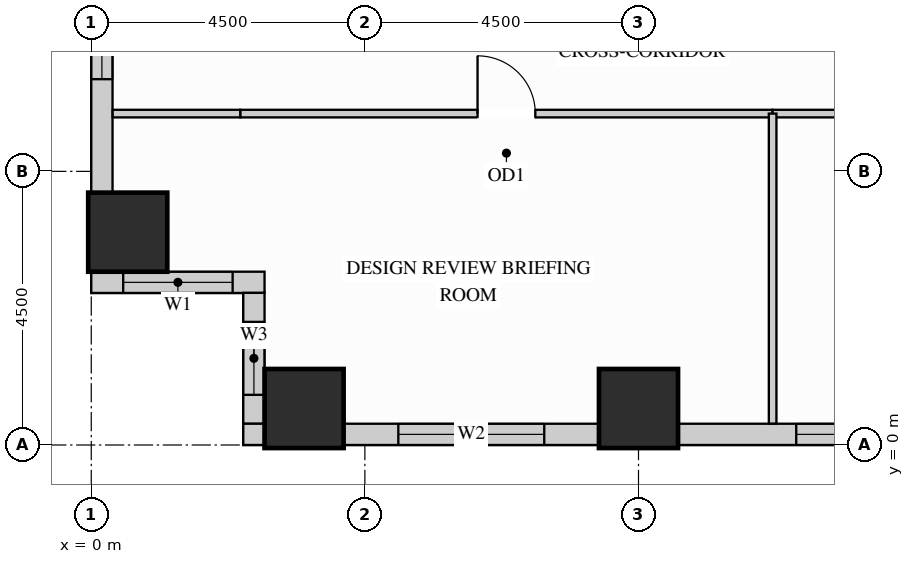
"""IFC4 building model, lengths in metres.
Left out: names, types, materials, properties, quantities, classifications, styles, units other than length and angle.
Written with IfcOpenShell. Run it as: python <this file> out.ifc"""

import sys

from ifc_helpers import new_model, si_unit, direction, frame, frame_2d, origin, origin_2d, place, context, subcontext, project, spatial, rectangle, extrude, source, transform, mapped, element, fill, save


model = new_model("IFC4")
c1 = context("Model", 3, precision=1e-05, world=origin(), true_north=direction((0.0, 1.0)))
c2 = subcontext(c1, "Body", "Model", "MODEL_VIEW")
j1 = project(units=[si_unit("LENGTHUNIT", "METRE"), si_unit("PLANEANGLEUNIT", "RADIAN")], contexts=[c1])
p1 = place(None, origin())
s1 = spatial("IfcSite", under=j1, at=p1, CompositionType="ELEMENT")
p2 = place(p1, origin())
s2 = spatial("IfcBuilding", under=s1, at=p2, CompositionType="ELEMENT")
p3 = place(p2, frame((0.0, 0.0, 26.1)))
s3 = spatial("IfcBuildingStorey", under=s2, at=p3, CompositionType="ELEMENT", Elevation=26.1)
m1 = source(origin(), c2, "Body", "SweptSolid", [
    extrude(rectangle(XDim=1.3, YDim=1.3, at=origin_2d()), origin(), (0.0, 0.0, 1.0), 3.38),
])
for number, where, z_axis, x_axis in (
    (1, (3.5, 0.6, 0.0), (0.0, 0.0, 1.0), (1.0, 0.0, 0.0)),
    (2, (9.0, 0.6, 0.0), (0.0, 0.0, 1.0), (1.0, 0.0, 0.0)),
    (3, (0.6, 3.5, 0.0), (0.0, 0.0, 1.0), (1.0, 0.0, 0.0)),
):
    element("IfcColumn", number, at=place(p3, frame(where, z_axis=z_axis, x_axis=x_axis)), inside=s3, PredefinedType="COLUMN", context=c2, shape_type="MappedRepresentation", body=[
        mapped(m1, transform((0.0, 0.0, 0.0), x_axis=(1.0, 0.0, 0.0), y_axis=(0.0, 1.0, 0.0), z_axis=(0.0, 0.0, 1.0))),
    ])
p4 = place(p3, frame((0.175, 7.852, 0.0), z_axis=(0.0, 0.0, 1.0), x_axis=(0.0, -1.0, 0.0)))
e4 = element("IfcWall", 4, at=p4, inside=s3, PredefinedType="SOLIDWALL", context=c2, shape_type="SweptSolid", body=[
    extrude(rectangle(XDim=3.704, YDim=0.35, at=frame_2d((1.852, 0.0))), origin(), (0.0, 0.0, 1.0), 2.51),
])
p5 = place(p4, frame((0.636, 0.0, 0.78)))
e5 = element("IfcOpeningElement", 5, at=p5, cuts=e4, PredefinedType="OPENING", context=c2, shape_type="SweptSolid", body=[
    extrude(rectangle(XDim=1.2, YDim=1.55, at=frame_2d((0.6, 0.775))), frame((0.0, 0.185, 0.0), z_axis=(0.0, -1.0, 0.0), x_axis=(1.0, 0.0, 0.0)), (0.0, 0.0, 1.0), 0.37),
])
p6 = place(p3, frame((0.0, 2.675, 0.0), z_axis=(0.0, 0.0, 1.0), x_axis=(1.0, 0.0, 0.0)))
e6 = element("IfcWall", 6, at=p6, inside=s3, PredefinedType="SOLIDWALL", context=c2, shape_type="SweptSolid", body=[
    extrude(rectangle(XDim=2.85, YDim=0.35, at=frame_2d((1.425, 0.0))), origin(), (0.0, 0.0, 1.0), 3.365),
])
p7 = place(p6, frame((0.525, 0.0, 0.78)))
e7 = element("IfcOpeningElement", 7, at=p7, cuts=e6, PredefinedType="OPENING", context=c2, shape_type="SweptSolid", body=[
    extrude(rectangle(XDim=1.8, YDim=2.1, at=frame_2d((0.9, 1.05))), frame((0.0, 0.185, 0.0), z_axis=(0.0, -1.0, 0.0), x_axis=(1.0, 0.0, 0.0)), (0.0, 0.0, 1.0), 0.37),
])
p8 = place(p3, frame((2.675, 2.502, 0.0), z_axis=(0.0, 0.0, 1.0), x_axis=(0.0, -1.0, 0.0)))
e8 = element("IfcWall", 8, at=p8, inside=s3, PredefinedType="SOLIDWALL", context=c2, shape_type="SweptSolid", body=[
    extrude(rectangle(XDim=2.154, YDim=0.35, at=frame_2d((1.077, 0.0))), origin(), (0.0, 0.0, 1.0), 3.365),
])
p9 = place(p8, frame((0.477, 0.0, 0.78)))
e9 = element("IfcOpeningElement", 9, at=p9, cuts=e8, PredefinedType="OPENING", context=c2, shape_type="SweptSolid", body=[
    extrude(rectangle(XDim=1.2, YDim=2.1, at=frame_2d((0.6, 1.05))), frame((0.0, 0.185, 0.0), z_axis=(0.0, -1.0, 0.0), x_axis=(1.0, 0.0, 0.0)), (0.0, 0.0, 1.0), 0.37),
])
m2 = source(origin(), c2, "Body", "SweptSolid", [
    extrude(rectangle(XDim=0.352, YDim=0.35, at=frame_2d((0.176, 0.0))), origin(), (0.0, 0.0, 1.0), 3.365),
])
p10 = place(p3, frame((2.5, 0.175, 0.0), z_axis=(0.0, 0.0, 1.0), x_axis=(1.0, 0.0, 0.0)))
e10 = element("IfcWall", 10, at=p10, inside=s3, PredefinedType="SOLIDWALL", context=c2, shape_type="MappedRepresentation", body=[
    mapped(m2, transform((0.0, 0.0, 0.0), x_axis=(1.0, 0.0, 0.0), y_axis=(0.0, 1.0, 0.0), z_axis=(0.0, 0.0, 1.0))),
])
p11 = place(p3, frame((4.148, 0.175, 0.0), z_axis=(0.0, 0.0, 1.0), x_axis=(1.0, 0.0, 0.0)))
e11 = element("IfcWall", 11, at=p11, inside=s3, PredefinedType="SOLIDWALL", context=c2, shape_type="SweptSolid", body=[
    extrude(rectangle(XDim=4.204, YDim=0.35, at=frame_2d((2.102, 0.0))), origin(), (0.0, 0.0, 1.0), 2.51),
])
p12 = place(p11, frame((0.902, 0.0, 0.78)))
e12 = element("IfcOpeningElement", 12, at=p12, cuts=e11, PredefinedType="OPENING", context=c2, shape_type="SweptSolid", body=[
    extrude(rectangle(XDim=2.4, YDim=1.55, at=frame_2d((1.2, 0.775))), frame((0.0, 0.185, 0.0), z_axis=(0.0, -1.0, 0.0), x_axis=(1.0, 0.0, 0.0)), (0.0, 0.0, 1.0), 0.37),
])
p13 = place(p3, frame((9.648, 0.175, 0.0), z_axis=(0.0, 0.0, 1.0), x_axis=(1.0, 0.0, 0.0)))
e13 = element("IfcWall", 13, at=p13, inside=s3, PredefinedType="SOLIDWALL", context=c2, shape_type="SweptSolid", body=[
    extrude(rectangle(XDim=4.204, YDim=0.35, at=frame_2d((2.102, 0.0))), origin(), (0.0, 0.0, 1.0), 2.51),
])
p14 = place(p13, frame((1.946, 0.0, 0.78)))
e14 = element("IfcOpeningElement", 14, at=p14, cuts=e13, PredefinedType="OPENING", context=c2, shape_type="SweptSolid", body=[
    extrude(rectangle(XDim=1.8, YDim=1.55, at=frame_2d((0.9, 0.775))), frame((0.0, 0.185, 0.0), z_axis=(0.0, -1.0, 0.0), x_axis=(1.0, 0.0, 0.0)), (0.0, 0.0, 1.0), 0.37),
])
p15 = place(p3, frame((2.45, 5.45, 0.0), z_axis=(0.0, 0.0, 1.0), x_axis=(1.0, 0.0, 0.0)))
e15 = element("IfcWall", 15, at=p15, inside=s3, PredefinedType="PARTITIONING", context=c2, shape_type="SweptSolid", body=[
    extrude(rectangle(XDim=8.756, YDim=0.125, at=frame_2d((4.378, 0.0))), origin(), (0.0, 0.0, 1.0), 3.365),
])
p16 = place(p15, frame((3.903, 0.0, 0.0)))
e16 = element("IfcOpeningElement", 16, at=p16, cuts=e15, PredefinedType="OPENING", context=c2, shape_type="SweptSolid", body=[
    extrude(rectangle(XDim=0.95, YDim=2.15, at=frame_2d((0.475, 1.075))), frame((0.0, 0.073, 0.0), z_axis=(0.0, -1.0, 0.0), x_axis=(1.0, 0.0, 0.0)), (0.0, 0.0, 1.0), 0.145),
])
p17 = place(p3, frame((11.206, 5.45, 0.0), z_axis=(0.0, 0.0, 1.0), x_axis=(1.0, 0.0, 0.0)))
e17 = element("IfcWall", 17, at=p17, inside=s3, PredefinedType="PARTITIONING", context=c2, shape_type="SweptSolid", body=[
    extrude(rectangle(XDim=5.844, YDim=0.125, at=frame_2d((2.922, 0.0))), origin(), (0.0, 0.0, 1.0), 3.365),
])
p18 = place(p17, frame((2.447, 0.0, 0.0)))
e18 = element("IfcOpeningElement", 18, at=p18, cuts=e17, PredefinedType="OPENING", context=c2, shape_type="SweptSolid", body=[
    extrude(rectangle(XDim=0.95, YDim=2.15, at=frame_2d((0.475, 1.075))), frame((0.0, 0.073, 0.0), z_axis=(0.0, -1.0, 0.0), x_axis=(1.0, 0.0, 0.0)), (0.0, 0.0, 1.0), 0.145),
])
m3 = source(origin(), c2, "Body", "SweptSolid", [
    extrude(rectangle(XDim=2.098, YDim=0.125, at=frame_2d((1.049, 0.0))), origin(), (0.0, 0.0, 1.0), 3.365),
])
p19 = place(p3, frame((0.352, 5.45, 0.0), z_axis=(0.0, 0.0, 1.0), x_axis=(1.0, 0.0, 0.0)))
e19 = element("IfcWall", 19, at=p19, inside=s3, PredefinedType="PARTITIONING", context=c2, shape_type="MappedRepresentation", body=[
    mapped(m3, transform((0.0, 0.0, 0.0), x_axis=(1.0, 0.0, 0.0), y_axis=(0.0, 1.0, 0.0), z_axis=(0.0, 0.0, 1.0))),
])
m4 = source(origin(), c2, "Body", "SweptSolid", [
    extrude(rectangle(XDim=5.098, YDim=0.125, at=frame_2d((2.549, 0.0))), origin(), (0.0, 0.0, 1.0), 3.365),
])
p20 = place(p3, frame((11.206, 0.352, 0.0), z_axis=(0.0, 0.0, 1.0), x_axis=(0.0, 1.0, 0.0)))
e20 = element("IfcWall", 20, at=p20, inside=s3, PredefinedType="PARTITIONING", context=c2, shape_type="MappedRepresentation", body=[
    mapped(m4, transform((0.0, 0.0, 0.0), x_axis=(1.0, 0.0, 0.0), y_axis=(0.0, 1.0, 0.0), z_axis=(0.0, 0.0, 1.0))),
])
m5 = source(origin(), c2, "Body", "SweptSolid", [
    extrude(rectangle(XDim=0.95, YDim=2.15, at=frame_2d((0.475, 1.075))), frame((0.0, 0.025, 0.0), z_axis=(0.0, -1.0, 0.0), x_axis=(1.0, 0.0, 0.0)), (0.0, 0.0, 1.0), 0.05),
])
p21 = place(p16, origin())
e21 = element("IfcDoor", 21, at=p21, inside=s3, OperationType="SINGLE_SWING_LEFT", PredefinedType="DOOR", context=c2, shape_type="MappedRepresentation", body=[
    mapped(m5, transform((0.0, 0.0, 0.0), x_axis=(1.0, 0.0, 0.0), y_axis=(0.0, 1.0, 0.0), z_axis=(0.0, 0.0, 1.0))),
])
fill(e16, e21)
m6 = source(origin(), c2, "Body", "SweptSolid", [
    extrude(rectangle(XDim=1.8, YDim=2.1, at=frame_2d((0.9, 1.05))), frame((0.0, 0.03, 0.0), z_axis=(0.0, -1.0, 0.0), x_axis=(1.0, 0.0, 0.0)), (0.0, 0.0, 1.0), 0.06),
])
p22 = place(p7, origin())
e22 = element("IfcWindow", 22, at=p22, inside=s3, PartitioningType="SINGLE_PANEL", PredefinedType="WINDOW", context=c2, shape_type="MappedRepresentation", body=[
    mapped(m6, transform((0.0, 0.0, 0.0), x_axis=(1.0, 0.0, 0.0), y_axis=(0.0, 1.0, 0.0), z_axis=(0.0, 0.0, 1.0))),
])
fill(e7, e22)
m7 = source(origin(), c2, "Body", "SweptSolid", [
    extrude(rectangle(XDim=1.8, YDim=1.55, at=frame_2d((0.9, 0.775))), frame((0.0, 0.03, 0.0), z_axis=(0.0, -1.0, 0.0), x_axis=(1.0, 0.0, 0.0)), (0.0, 0.0, 1.0), 0.06),
])
p23 = place(p14, origin())
e23 = element("IfcWindow", 23, at=p23, inside=s3, PartitioningType="SINGLE_PANEL", PredefinedType="WINDOW", context=c2, shape_type="MappedRepresentation", body=[
    mapped(m7, transform((0.0, 0.0, 0.0), x_axis=(1.0, 0.0, 0.0), y_axis=(0.0, 1.0, 0.0), z_axis=(0.0, 0.0, 1.0))),
])
fill(e14, e23)
m8 = source(origin(), c2, "Body", "SweptSolid", [
    extrude(rectangle(XDim=2.4, YDim=1.55, at=frame_2d((1.2, 0.775))), frame((0.0, 0.03, 0.0), z_axis=(0.0, -1.0, 0.0), x_axis=(1.0, 0.0, 0.0)), (0.0, 0.0, 1.0), 0.06),
])
p24 = place(p12, origin())
e24 = element("IfcWindow", 24, at=p24, inside=s3, PartitioningType="SINGLE_PANEL", PredefinedType="WINDOW", context=c2, shape_type="MappedRepresentation", body=[
    mapped(m8, transform((0.0, 0.0, 0.0), x_axis=(1.0, 0.0, 0.0), y_axis=(0.0, 1.0, 0.0), z_axis=(0.0, 0.0, 1.0))),
])
fill(e12, e24)
m9 = source(origin(), c2, "Body", "SweptSolid", [
    extrude(rectangle(XDim=1.2, YDim=1.55, at=frame_2d((0.6, 0.775))), frame((0.0, 0.03, 0.0), z_axis=(0.0, -1.0, 0.0), x_axis=(1.0, 0.0, 0.0)), (0.0, 0.0, 1.0), 0.06),
])
p25 = place(p5, origin())
e25 = element("IfcWindow", 25, at=p25, inside=s3, PartitioningType="SINGLE_PANEL", PredefinedType="WINDOW", context=c2, shape_type="MappedRepresentation", body=[
    mapped(m9, transform((0.0, 0.0, 0.0), x_axis=(1.0, 0.0, 0.0), y_axis=(0.0, 1.0, 0.0), z_axis=(0.0, 0.0, 1.0))),
])
fill(e5, e25)
m10 = source(origin(), c2, "Body", "SweptSolid", [
    extrude(rectangle(XDim=1.2, YDim=2.1, at=frame_2d((0.6, 1.05))), frame((0.0, 0.03, 0.0), z_axis=(0.0, -1.0, 0.0), x_axis=(1.0, 0.0, 0.0)), (0.0, 0.0, 1.0), 0.06),
])
p26 = place(p9, origin())
e26 = element("IfcWindow", 26, at=p26, inside=s3, PartitioningType="SINGLE_PANEL", PredefinedType="WINDOW", context=c2, shape_type="MappedRepresentation", body=[
    mapped(m10, transform((0.0, 0.0, 0.0), x_axis=(1.0, 0.0, 0.0), y_axis=(0.0, 1.0, 0.0), z_axis=(0.0, 0.0, 1.0))),
])
fill(e9, e26)
save(model, sys.argv[1])
